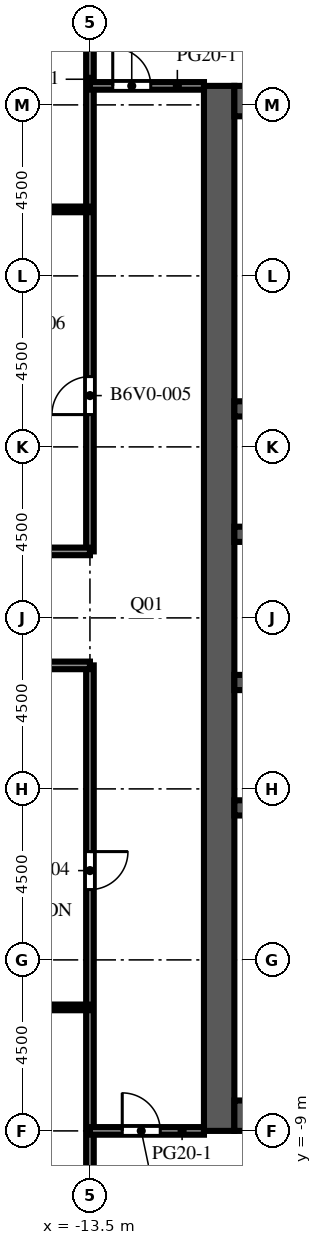
"""IFC4 building model, lengths in metres.
Left out: names, types, materials, properties, quantities, classifications, styles, units other than length and angle.
Written with IfcOpenShell. Run it as: python <this file> out.ifc"""

import sys

from ifc_helpers import new_model, si_unit, direction, frame, frame_2d, origin, place, context, subcontext, project, spatial, rectangle, extrude, element, fill, save


model = new_model("IFC4")
c1 = context("Model", 3, precision=1e-05, world=origin(), true_north=direction((0.0, 1.0)))
c2 = subcontext(c1, "Body", "Model", "MODEL_VIEW")
j1 = project(units=[si_unit("LENGTHUNIT", "METRE"), si_unit("PLANEANGLEUNIT", "RADIAN")], contexts=[c1])
p1 = place(None, origin())
s1 = spatial("IfcSite", under=j1, at=p1, CompositionType="ELEMENT")
p2 = place(p1, origin())
s2 = spatial("IfcBuilding", under=s1, at=p2, CompositionType="ELEMENT")
p3 = place(p2, frame((0.0, 0.0, 195.6)))
s3 = spatial("IfcBuildingStorey", under=s2, at=p3, CompositionType="ELEMENT", Elevation=195.6)
p4 = place(p3, frame((-10.1, -9.0, 0.0), z_axis=(0.0, 0.0, 1.0), x_axis=(0.0, 1.0, 0.0)))
e1 = element("IfcWall", 1, at=p4, inside=s3, PredefinedType="SHEAR", context=c2, shape_type="SweptSolid", body=[
    extrude(rectangle(XDim=27.5, YDim=0.8, at=frame_2d((13.75, 0.0))), origin(), (0.0, 0.0, 1.0), 4.1),
])
p5 = place(p4, frame((12.55, 0.0, 0.0)))
e2 = element("IfcOpeningElement", 2, at=p5, cuts=e1, PredefinedType="OPENING", context=c2, shape_type="SweptSolid", body=[
    extrude(rectangle(XDim=2.4, YDim=2.4, at=frame_2d((1.2, 1.2))), frame((0.0, 0.41, 0.0), z_axis=(0.0, -1.0, 0.0), x_axis=(1.0, 0.0, 0.0)), (0.0, 0.0, 1.0), 0.82),
])
p6 = place(p4, frame((6.825, 0.0, 0.0)))
e3 = element("IfcOpeningElement", 3, at=p6, cuts=e1, PredefinedType="OPENING", context=c2, shape_type="SweptSolid", body=[
    extrude(rectangle(XDim=1.2, YDim=2.1, at=frame_2d((0.6, 1.05))), frame((0.0, 0.41, 0.0), z_axis=(0.0, -1.0, 0.0), x_axis=(1.0, 0.0, 0.0)), (0.0, 0.0, 1.0), 0.82),
])
p7 = place(p4, frame((19.475, 0.0, 0.0)))
e4 = element("IfcOpeningElement", 4, at=p7, cuts=e1, PredefinedType="OPENING", context=c2, shape_type="SweptSolid", body=[
    extrude(rectangle(XDim=1.2, YDim=2.1, at=frame_2d((0.6, 1.05))), frame((0.0, 0.41, 0.0), z_axis=(0.0, -1.0, 0.0), x_axis=(1.0, 0.0, 0.0)), (0.0, 0.0, 1.0), 0.82),
])
for number, where, z_axis, x_axis in (
    (5, (-9.7, -8.6, 0.0), (0.0, 0.0, 1.0), (1.0, 0.0, 0.0)),
    (6, (-9.7, 18.1, 0.0), (0.0, 0.0, 1.0), (1.0, 0.0, 0.0)),
):
    element("IfcWall", number, at=place(p3, frame(where, z_axis=z_axis, x_axis=x_axis)), inside=s3, PredefinedType="SHEAR", context=c2, shape_type="SweptSolid", body=[
        extrude(rectangle(XDim=10.4, YDim=0.8, at=frame_2d((5.2, 0.0))), origin(), (0.0, 0.0, 1.0), 4.1),
    ])
p8 = place(p3, frame((-9.7, -0.5, 0.0), z_axis=(0.0, 0.0, 1.0), x_axis=(1.0, 0.0, 0.0)))
e7 = element("IfcWall", 7, at=p8, inside=s3, PredefinedType="SHEAR", context=c2, shape_type="SweptSolid", body=[
    extrude(rectangle(XDim=10.4, YDim=0.4, at=frame_2d((5.2, 0.0))), origin(), (0.0, 0.0, 1.0), 4.1),
])
p9 = place(p3, frame((-9.7, 2.8, 0.0), z_axis=(0.0, 0.0, 1.0), x_axis=(1.0, 0.0, 0.0)))
e8 = element("IfcWall", 8, at=p9, inside=s3, PredefinedType="SHEAR", context=c2, shape_type="SweptSolid", body=[
    extrude(rectangle(XDim=10.4, YDim=0.4, at=frame_2d((5.2, 0.0))), origin(), (0.0, 0.0, 1.0), 4.1),
])
p10 = place(p9, frame((0.738, 0.0, 0.0)))
e9 = element("IfcOpeningElement", 9, at=p10, cuts=e8, PredefinedType="OPENING", context=c2, shape_type="SweptSolid", body=[
    extrude(rectangle(XDim=1.1, YDim=2.1, at=frame_2d((0.55, 1.05))), frame((0.0, 0.21, 0.0), z_axis=(0.0, -1.0, 0.0), x_axis=(1.0, 0.0, 0.0)), (0.0, 0.0, 1.0), 0.42),
])
p11 = place(p9, frame((3.337, 0.0, 0.0)))
e10 = element("IfcOpeningElement", 10, at=p11, cuts=e8, PredefinedType="OPENING", context=c2, shape_type="SweptSolid", body=[
    extrude(rectangle(XDim=1.1, YDim=2.1, at=frame_2d((0.55, 1.05))), frame((0.0, 0.21, 0.0), z_axis=(0.0, -1.0, 0.0), x_axis=(1.0, 0.0, 0.0)), (0.0, 0.0, 1.0), 0.42),
])
p12 = place(p9, frame((6.012, 0.0, 0.0)))
e11 = element("IfcOpeningElement", 11, at=p12, cuts=e8, PredefinedType="OPENING", context=c2, shape_type="SweptSolid", body=[
    extrude(rectangle(XDim=1.0, YDim=2.1, at=frame_2d((0.5, 1.05))), frame((0.0, 0.21, 0.0), z_axis=(0.0, -1.0, 0.0), x_axis=(1.0, 0.0, 0.0)), (0.0, 0.0, 1.0), 0.42),
])
p13 = place(p9, frame((8.613, 0.0, 0.0)))
e12 = element("IfcOpeningElement", 12, at=p13, cuts=e8, PredefinedType="OPENING", context=c2, shape_type="SweptSolid", body=[
    extrude(rectangle(XDim=1.0, YDim=2.1, at=frame_2d((0.5, 1.05))), frame((0.0, 0.21, 0.0), z_axis=(0.0, -1.0, 0.0), x_axis=(1.0, 0.0, 0.0)), (0.0, 0.0, 1.0), 0.42),
])
p14 = place(p3, frame((-9.7, 6.7, 0.0), z_axis=(0.0, 0.0, 1.0), x_axis=(1.0, 0.0, 0.0)))
e13 = element("IfcWall", 13, at=p14, inside=s3, PredefinedType="SHEAR", context=c2, shape_type="SweptSolid", body=[
    extrude(rectangle(XDim=10.4, YDim=0.4, at=frame_2d((5.2, 0.0))), origin(), (0.0, 0.0, 1.0), 4.1),
])
p15 = place(p14, frame((3.337, 0.0, 0.0)))
e14 = element("IfcOpeningElement", 14, at=p15, cuts=e13, PredefinedType="OPENING", context=c2, shape_type="SweptSolid", body=[
    extrude(rectangle(XDim=1.1, YDim=2.1, at=frame_2d((0.55, 1.05))), frame((0.0, 0.21, 0.0), z_axis=(0.0, -1.0, 0.0), x_axis=(1.0, 0.0, 0.0)), (0.0, 0.0, 1.0), 0.42),
])
p16 = place(p14, frame((5.962, 0.0, 0.0)))
e15 = element("IfcOpeningElement", 15, at=p16, cuts=e13, PredefinedType="OPENING", context=c2, shape_type="SweptSolid", body=[
    extrude(rectangle(XDim=1.1, YDim=2.1, at=frame_2d((0.55, 1.05))), frame((0.0, 0.21, 0.0), z_axis=(0.0, -1.0, 0.0), x_axis=(1.0, 0.0, 0.0)), (0.0, 0.0, 1.0), 0.42),
])
p17 = place(p14, frame((8.663, 0.0, 0.0)))
e16 = element("IfcOpeningElement", 16, at=p17, cuts=e13, PredefinedType="OPENING", context=c2, shape_type="SweptSolid", body=[
    extrude(rectangle(XDim=1.1, YDim=2.1, at=frame_2d((0.55, 1.05))), frame((0.0, 0.21, 0.0), z_axis=(0.0, -1.0, 0.0), x_axis=(1.0, 0.0, 0.0)), (0.0, 0.0, 1.0), 0.42),
])
p18 = place(p14, frame((0.688, 0.0, 0.0)))
e17 = element("IfcOpeningElement", 17, at=p18, cuts=e13, PredefinedType="OPENING", context=c2, shape_type="SweptSolid", body=[
    extrude(rectangle(XDim=1.0, YDim=2.1, at=frame_2d((0.5, 1.05))), frame((0.0, 0.21, 0.0), z_axis=(0.0, -1.0, 0.0), x_axis=(1.0, 0.0, 0.0)), (0.0, 0.0, 1.0), 0.42),
])
p19 = place(p3, frame((-9.7, 10.0, 0.0), z_axis=(0.0, 0.0, 1.0), x_axis=(1.0, 0.0, 0.0)))
e18 = element("IfcWall", 18, at=p19, inside=s3, PredefinedType="SHEAR", context=c2, shape_type="SweptSolid", body=[
    extrude(rectangle(XDim=10.4, YDim=0.4, at=frame_2d((5.2, 0.0))), origin(), (0.0, 0.0, 1.0), 4.1),
])
p20 = place(p3, frame((-13.5, -26.5, 0.0), z_axis=(0.0, 0.0, 1.0), x_axis=(0.0, 1.0, 0.0)))
e19 = element("IfcWall", 19, at=p20, inside=s3, PredefinedType="PARTITIONING", context=c2, shape_type="SweptSolid", body=[
    extrude(rectangle(XDim=29.75, YDim=0.2, at=frame_2d((14.875, 0.0))), origin(), (0.0, 0.0, 1.0), 3.65),
])
p21 = place(p20, frame((23.85, 0.0, 0.0)))
e20 = element("IfcOpeningElement", 20, at=p21, cuts=e19, PredefinedType="OPENING", context=c2, shape_type="SweptSolid", body=[
    extrude(rectangle(XDim=1.0, YDim=2.1, at=frame_2d((0.5, 1.05))), frame((0.0, 0.11, 0.0), z_axis=(0.0, -1.0, 0.0), x_axis=(1.0, 0.0, 0.0)), (0.0, 0.0, 1.0), 0.22),
])
p22 = place(p3, frame((-13.5, 6.25, 0.0), z_axis=(0.0, 0.0, 1.0), x_axis=(0.0, 1.0, 0.0)))
e21 = element("IfcWall", 21, at=p22, inside=s3, PredefinedType="PARTITIONING", context=c2, shape_type="SweptSolid", body=[
    extrude(rectangle(XDim=20.25, YDim=0.2, at=frame_2d((10.125, 0.0))), origin(), (0.0, 0.0, 1.0), 3.65),
])
p23 = place(p22, frame((3.6, 0.0, 0.0)))
e22 = element("IfcOpeningElement", 22, at=p23, cuts=e21, PredefinedType="OPENING", context=c2, shape_type="SweptSolid", body=[
    extrude(rectangle(XDim=1.0, YDim=2.1, at=frame_2d((0.5, 1.05))), frame((0.0, 0.11, 0.0), z_axis=(0.0, -1.0, 0.0), x_axis=(1.0, 0.0, 0.0)), (0.0, 0.0, 1.0), 0.22),
])
p24 = place(p3, frame((-10.5, -9.0, 0.0), z_axis=(0.0, 0.0, 1.0), x_axis=(-1.0, 0.0, 0.0)))
e23 = element("IfcWall", 23, at=p24, inside=s3, PredefinedType="PARTITIONING", context=c2, shape_type="SweptSolid", body=[
    extrude(rectangle(XDim=3.0, YDim=0.2, at=frame_2d((1.5, 0.0))), origin(), (0.0, 0.0, 1.0), 3.65),
])
p25 = place(p24, frame((1.15, 0.0, 0.0)))
e24 = element("IfcOpeningElement", 24, at=p25, cuts=e23, PredefinedType="OPENING", context=c2, shape_type="SweptSolid", body=[
    extrude(rectangle(XDim=1.0, YDim=2.1, at=frame_2d((0.5, 1.05))), frame((0.0, 0.11, 0.0), z_axis=(0.0, -1.0, 0.0), x_axis=(1.0, 0.0, 0.0)), (0.0, 0.0, 1.0), 0.22),
])
p26 = place(p3, frame((-13.5, -5.75, 0.0), z_axis=(0.0, 0.0, 1.0), x_axis=(-1.0, 0.0, 0.0)))
e25 = element("IfcWall", 25, at=p26, inside=s3, PredefinedType="PARTITIONING", context=c2, shape_type="SweptSolid", body=[
    extrude(rectangle(XDim=8.85, YDim=0.15, at=frame_2d((4.425, 0.0))), origin(), (0.0, 0.0, 1.0), 3.65),
])
p27 = place(p26, frame((4.65, 0.0, 0.0)))
e26 = element("IfcOpeningElement", 26, at=p27, cuts=e25, PredefinedType="OPENING", context=c2, shape_type="SweptSolid", body=[
    extrude(rectangle(XDim=1.0, YDim=2.1, at=frame_2d((0.5, 1.05))), frame((0.0, 0.085, 0.0), z_axis=(0.0, -1.0, 0.0), x_axis=(1.0, 0.0, 0.0)), (0.0, 0.0, 1.0), 0.17),
])
for number, where, z_axis, x_axis in (
    (27, (-22.35, 3.25, 0.0), (0.0, 0.0, 1.0), (1.0, 0.0, 0.0)),
    (28, (-22.35, 6.25, 0.0), (0.0, 0.0, 1.0), (1.0, 0.0, 0.0)),
):
    element("IfcWall", number, at=place(p3, frame(where, z_axis=z_axis, x_axis=x_axis)), inside=s3, PredefinedType="PARTITIONING", context=c2, shape_type="SweptSolid", body=[
        extrude(rectangle(XDim=8.85, YDim=0.2, at=frame_2d((4.425, 0.0))), origin(), (0.0, 0.0, 1.0), 3.65),
    ])
p28 = place(p3, frame((-22.35, 15.25, 0.0), z_axis=(0.0, 0.0, 1.0), x_axis=(1.0, 0.0, 0.0)))
e29 = element("IfcWall", 29, at=p28, inside=s3, PredefinedType="PARTITIONING", context=c2, shape_type="SweptSolid", body=[
    extrude(rectangle(XDim=8.85, YDim=0.15, at=frame_2d((4.425, 0.0))), origin(), (0.0, 0.0, 1.0), 3.65),
])
p29 = place(p28, frame((4.7, 0.0, 0.0)))
e30 = element("IfcOpeningElement", 30, at=p29, cuts=e29, PredefinedType="OPENING", context=c2, shape_type="SweptSolid", body=[
    extrude(rectangle(XDim=1.0, YDim=2.1, at=frame_2d((0.5, 1.05))), frame((0.0, 0.085, 0.0), z_axis=(0.0, -1.0, 0.0), x_axis=(1.0, 0.0, 0.0)), (0.0, 0.0, 1.0), 0.17),
])
p30 = place(p3, frame((-13.5, 18.5, 0.0), z_axis=(0.0, 0.0, 1.0), x_axis=(1.0, 0.0, 0.0)))
e31 = element("IfcWall", 31, at=p30, inside=s3, PredefinedType="PARTITIONING", context=c2, shape_type="SweptSolid", body=[
    extrude(rectangle(XDim=3.0, YDim=0.2, at=frame_2d((1.5, 0.0))), origin(), (0.0, 0.0, 1.0), 3.65),
])
p31 = place(p30, frame((0.6, 0.0, 0.0)))
e32 = element("IfcOpeningElement", 32, at=p31, cuts=e31, PredefinedType="OPENING", context=c2, shape_type="SweptSolid", body=[
    extrude(rectangle(XDim=1.0, YDim=2.1, at=frame_2d((0.5, 1.05))), frame((0.0, 0.11, 0.0), z_axis=(0.0, -1.0, 0.0), x_axis=(1.0, 0.0, 0.0)), (0.0, 0.0, 1.0), 0.22),
])
p32 = place(p5, origin())
e33 = element("IfcDoor", 33, at=p32, inside=s3, OperationType="DOUBLE_DOOR_DOUBLE_SWING", PredefinedType="DOOR", context=c2, shape_type="SweptSolid", body=[
    extrude(rectangle(XDim=2.4, YDim=2.4, at=frame_2d((1.2, 1.2))), frame((0.0, 0.025, 0.0), z_axis=(0.0, -1.0, 0.0), x_axis=(1.0, 0.0, 0.0)), (0.0, 0.0, 1.0), 0.05),
])
fill(e2, e33)
p33 = place(p6, origin())
e34 = element("IfcDoor", 34, at=p33, inside=s3, OperationType="SINGLE_SWING_LEFT", PredefinedType="DOOR", context=c2, shape_type="SweptSolid", body=[
    extrude(rectangle(XDim=1.2, YDim=2.1, at=frame_2d((0.6, 1.05))), frame((0.0, 0.025, 0.0), z_axis=(0.0, -1.0, 0.0), x_axis=(1.0, 0.0, 0.0)), (0.0, 0.0, 1.0), 0.05),
])
fill(e3, e34)
p34 = place(p7, origin())
e35 = element("IfcDoor", 35, at=p34, inside=s3, OperationType="SINGLE_SWING_LEFT", PredefinedType="DOOR", context=c2, shape_type="SweptSolid", body=[
    extrude(rectangle(XDim=1.2, YDim=2.1, at=frame_2d((0.6, 1.05))), frame((0.0, 0.025, 0.0), z_axis=(0.0, -1.0, 0.0), x_axis=(1.0, 0.0, 0.0)), (0.0, 0.0, 1.0), 0.05),
])
fill(e4, e35)
p35 = place(p21, origin())
e36 = element("IfcDoor", 36, at=p35, inside=s3, OperationType="SINGLE_SWING_RIGHT", PredefinedType="DOOR", context=c2, shape_type="SweptSolid", body=[
    extrude(rectangle(XDim=1.0, YDim=2.1, at=frame_2d((0.5, 1.05))), frame((0.0, 0.025, 0.0), z_axis=(0.0, -1.0, 0.0), x_axis=(1.0, 0.0, 0.0)), (0.0, 0.0, 1.0), 0.05),
])
fill(e20, e36)
p36 = place(p23, origin())
e37 = element("IfcDoor", 37, at=p36, inside=s3, OperationType="SINGLE_SWING_LEFT", PredefinedType="DOOR", context=c2, shape_type="SweptSolid", body=[
    extrude(rectangle(XDim=1.0, YDim=2.1, at=frame_2d((0.5, 1.05))), frame((0.0, 0.025, 0.0), z_axis=(0.0, -1.0, 0.0), x_axis=(1.0, 0.0, 0.0)), (0.0, 0.0, 1.0), 0.05),
])
fill(e22, e37)
p37 = place(p25, origin())
e38 = element("IfcDoor", 38, at=p37, inside=s3, OperationType="SINGLE_SWING_RIGHT", PredefinedType="DOOR", context=c2, shape_type="SweptSolid", body=[
    extrude(rectangle(XDim=1.0, YDim=2.1, at=frame_2d((0.5, 1.05))), frame((0.0, 0.025, 0.0), z_axis=(0.0, -1.0, 0.0), x_axis=(1.0, 0.0, 0.0)), (0.0, 0.0, 1.0), 0.05),
])
fill(e24, e38)
p38 = place(p31, origin())
e39 = element("IfcDoor", 39, at=p38, inside=s3, OperationType="SINGLE_SWING_LEFT", PredefinedType="DOOR", context=c2, shape_type="SweptSolid", body=[
    extrude(rectangle(XDim=1.0, YDim=2.1, at=frame_2d((0.5, 1.05))), frame((0.0, 0.025, 0.0), z_axis=(0.0, -1.0, 0.0), x_axis=(1.0, 0.0, 0.0)), (0.0, 0.0, 1.0), 0.05),
])
fill(e32, e39)
save(model, sys.argv[1])
